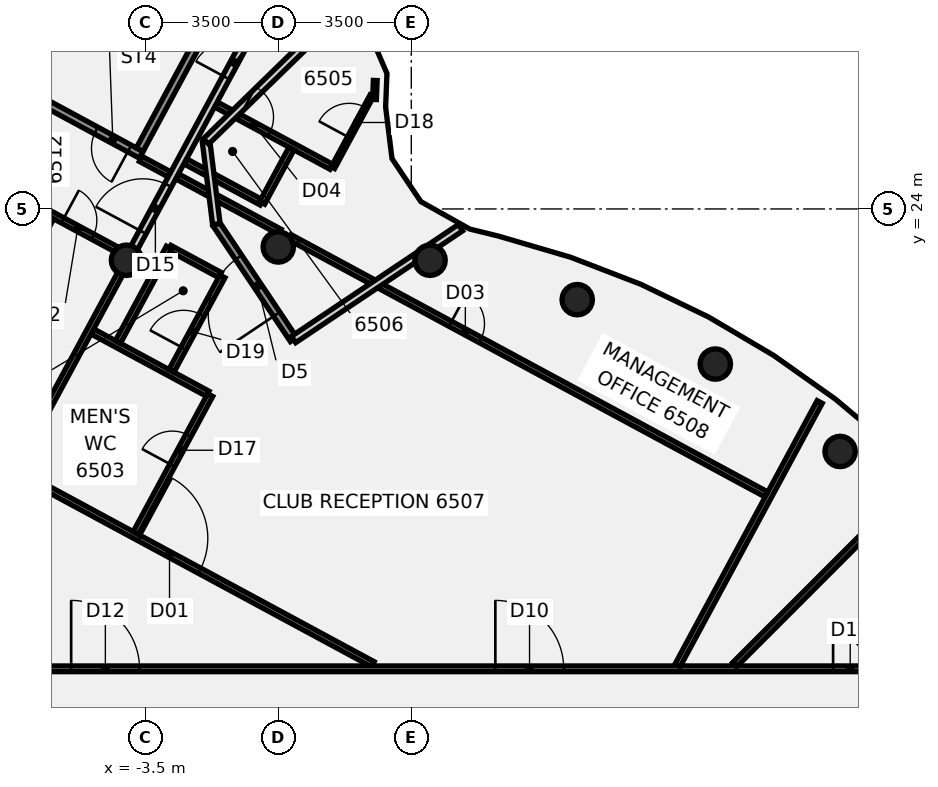
"""IFC4 building model, lengths in metres.
Left out: names, types, materials, properties, quantities, classifications, styles, units other than length and angle.
Written with IfcOpenShell. Run it as: python <this file> out.ifc"""

import sys

from ifc_helpers import new_model, si_unit, direction, frame, frame_2d, origin, origin_2d, place, context, subcontext, project, spatial, rectangle, circle, extrude, element, fill, save


model = new_model("IFC4")
c1 = context("Model", 3, precision=1e-05, world=origin(), true_north=direction((0.0, 1.0)))
c2 = subcontext(c1, "Body", "Model", "MODEL_VIEW")
j1 = project(units=[si_unit("LENGTHUNIT", "METRE"), si_unit("PLANEANGLEUNIT", "RADIAN")], contexts=[c1])
p1 = place(None, origin())
s1 = spatial("IfcSite", under=j1, at=p1, CompositionType="ELEMENT")
p2 = place(p1, origin())
s2 = spatial("IfcBuilding", under=s1, at=p2, CompositionType="ELEMENT")
p3 = place(p2, frame((0.0, 0.0, 256.8)))
s3 = spatial("IfcBuildingStorey", under=s2, at=p3, CompositionType="ELEMENT", Elevation=256.8)
for number, where, z_axis, x_axis in (
    (1, (14.784, 17.619, -0.14), (0.0, 0.0, 1.0), (1.0, 0.0, 0.0)),
    (2, (11.5, 19.919, -0.14), (0.0, 0.0, 1.0), (1.0, 0.0, 0.0)),
    (3, (7.866, 21.613, -0.14), (0.0, 0.0, 1.0), (1.0, 0.0, 0.0)),
    (4, (3.994, 22.651, -0.14), (0.0, 0.0, 1.0), (1.0, 0.0, 0.0)),
    (5, (0.0, 23.0, -0.14), (0.0, 0.0, 1.0), (1.0, 0.0, 0.0)),
    (6, (-3.994, 22.651, -0.14), (0.0, 0.0, 1.0), (1.0, 0.0, 0.0)),
):
    element("IfcColumn", number, at=place(p3, frame(where, z_axis=z_axis, x_axis=x_axis)), inside=s3, PredefinedType="COLUMN", context=c2, shape_type="SweptSolid", body=[
        extrude(circle(Radius=0.4, at=origin_2d()), origin(), (0.0, 0.0, 1.0), 3.6),
    ])
p4 = place(p3, frame((-11.424, 19.529, 0.0), z_axis=(0.0, 0.0, 1.0), x_axis=(0.880009979756, -0.474955193181, 0.0)))
e7 = element("IfcWall", 7, at=p4, inside=s3, PredefinedType="PARTITIONING", context=c2, shape_type="SweptSolid", body=[
    extrude(rectangle(XDim=15.808, YDim=0.15, at=frame_2d((7.904, 0.0))), origin(), (0.0, 0.0, 1.0), 2.864),
])
p5 = place(p4, frame((8.829, 0.0, 0.0)))
e8 = element("IfcOpeningElement", 8, at=p5, cuts=e7, PredefinedType="OPENING", context=c2, shape_type="SweptSolid", body=[
    extrude(rectangle(XDim=1.8, YDim=2.1, at=frame_2d((0.9, 1.05))), frame((0.0, 0.085, 0.0), z_axis=(0.0, -1.0, 0.0), x_axis=(1.0, 0.0, 0.0)), (0.0, 0.0, 1.0), 0.17),
])
p6 = place(p3, frame((-7.808, 24.85, 0.0), z_axis=(0.0, 0.0, 1.0), x_axis=(0.879989576418, -0.474992995101, 0.0)))
e9 = element("IfcWall", 9, at=p6, inside=s3, PredefinedType="PARTITIONING", context=c2, shape_type="SweptSolid", body=[
    extrude(rectangle(XDim=4.025, YDim=0.15, at=frame_2d((2.013, 0.0))), origin(), (0.0, 0.0, 1.0), 2.864),
])
p7 = place(p6, frame((2.425, 0.0, 0.0)))
e10 = element("IfcOpeningElement", 10, at=p7, cuts=e9, PredefinedType="OPENING", context=c2, shape_type="SweptSolid", body=[
    extrude(rectangle(XDim=0.9, YDim=2.1, at=frame_2d((0.45, 1.05))), frame((0.0, 0.085, 0.0), z_axis=(0.0, -1.0, 0.0), x_axis=(1.0, 0.0, 0.0)), (0.0, 0.0, 1.0), 0.17),
])
p8 = place(p3, frame((-4.893, 20.777, 0.0), z_axis=(0.0, 0.0, 1.0), x_axis=(0.880007149788, -0.474960436586, 0.0)))
e11 = element("IfcWall", 11, at=p8, inside=s3, PredefinedType="PARTITIONING", context=c2, shape_type="SweptSolid", body=[
    extrude(rectangle(XDim=3.45, YDim=0.15, at=frame_2d((1.725, 0.0))), origin(), (0.0, 0.0, 1.0), 2.864),
])
p9 = place(p3, frame((-3.619, 25.317, 0.0), z_axis=(0.0, 0.0, 1.0), x_axis=(0.879960000932, -0.475047783659, 0.0)))
e12 = element("IfcWall", 12, at=p9, inside=s3, PredefinedType="PARTITIONING", context=c2, shape_type="SweptSolid", body=[
    extrude(rectangle(XDim=0.86, YDim=0.15, at=frame_2d((0.43, 0.0))), origin(), (0.0, 0.0, 1.0), 2.864),
])
p10 = place(p3, frame((-2.86, 22.976, 0.0), z_axis=(0.0, 0.0, 1.0), x_axis=(0.880085616352, -0.474815024921, 0.0)))
e13 = element("IfcWall", 13, at=p10, inside=s3, PredefinedType="PARTITIONING", context=c2, shape_type="SweptSolid", body=[
    extrude(rectangle(XDim=1.506, YDim=0.15, at=frame_2d((0.753, 0.0))), origin(), (0.0, 0.0, 1.0), 2.864),
])
p11 = place(p3, frame((-2.662, 24.857, 0.0), z_axis=(0.0, 0.0, 1.0), x_axis=(0.880044328611, -0.474891545176, 0.0)))
e14 = element("IfcWall", 14, at=p11, inside=s3, PredefinedType="PARTITIONING", context=c2, shape_type="SweptSolid", body=[
    extrude(rectangle(XDim=3.07, YDim=0.15, at=frame_2d((1.535, 0.0))), origin(), (0.0, 0.0, 1.0), 2.864),
])
p12 = place(p3, frame((0.302, 23.258, 0.0), z_axis=(0.0, 0.0, 1.0), x_axis=(0.88000876601, -0.474957442037, 0.0)))
e15 = element("IfcWall", 15, at=p12, inside=s3, PredefinedType="PARTITIONING", context=c2, shape_type="SweptSolid", body=[
    extrude(rectangle(XDim=14.256, YDim=0.15, at=frame_2d((7.128, 0.0))), origin(), (0.0, 0.0, 1.0), 2.864),
])
p13 = place(p12, frame((4.8, 0.0, 0.0)))
e16 = element("IfcOpeningElement", 16, at=p13, cuts=e15, PredefinedType="OPENING", context=c2, shape_type="SweptSolid", body=[
    extrude(rectangle(XDim=0.9, YDim=2.1, at=frame_2d((0.45, 1.05))), frame((0.0, 0.085, 0.0), z_axis=(0.0, -1.0, 0.0), x_axis=(1.0, 0.0, 0.0)), (0.0, 0.0, 1.0), 0.17),
])
p14 = place(p3, frame((-2.445, 25.251, 0.0), z_axis=(0.0, 0.0, 1.0), x_axis=(0.879950258975, -0.475065828839, 0.0)))
e17 = element("IfcWall", 17, at=p14, inside=s3, PredefinedType="PARTITIONING", context=c2, shape_type="SweptSolid", body=[
    extrude(rectangle(XDim=2.275, YDim=0.15, at=frame_2d((1.138, 0.0))), origin(), (0.0, 0.0, 1.0), 2.864),
])
p15 = place(p3, frame((-1.641, 26.75, 0.0), z_axis=(0.0, 0.0, 1.0), x_axis=(0.879977572417, -0.475015233486, 0.0)))
e18 = element("IfcWall", 18, at=p15, inside=s3, PredefinedType="PARTITIONING", context=c2, shape_type="SweptSolid", body=[
    extrude(rectangle(XDim=3.45, YDim=0.15, at=frame_2d((1.725, 0.0))), origin(), (0.0, 0.0, 1.0), 2.864),
])
p16 = place(p15, frame((0.7, 0.0, 0.0)))
e19 = element("IfcOpeningElement", 19, at=p16, cuts=e18, PredefinedType="OPENING", context=c2, shape_type="SweptSolid", body=[
    extrude(rectangle(XDim=0.9, YDim=2.1, at=frame_2d((0.45, 1.05))), frame((0.0, 0.085, 0.0), z_axis=(0.0, -1.0, 0.0), x_axis=(1.0, 0.0, 0.0)), (0.0, 0.0, 1.0), 0.17),
])
p17 = place(p3, frame((-17.065, 11.9, 0.0), z_axis=(0.0, 0.0, 1.0), x_axis=(1.0, 0.0, 0.0)))
e20 = element("IfcWall", 20, at=p17, inside=s3, PredefinedType="PARTITIONING", context=c2, shape_type="SweptSolid", body=[
    extrude(rectangle(XDim=34.165, YDim=0.15, at=frame_2d((17.083, 0.0))), origin(), (0.0, 0.0, 1.0), 2.864),
])
p18 = place(p17, frame((22.777, 0.0, 0.0)))
e21 = element("IfcOpeningElement", 21, at=p18, cuts=e20, PredefinedType="OPENING", context=c2, shape_type="SweptSolid", body=[
    extrude(rectangle(XDim=1.8, YDim=2.1, at=frame_2d((0.9, 1.05))), frame((0.0, 0.085, 0.0), z_axis=(0.0, -1.0, 0.0), x_axis=(1.0, 0.0, 0.0)), (0.0, 0.0, 1.0), 0.17),
])
p19 = place(p17, frame((31.665, 0.0, 0.0)))
e22 = element("IfcOpeningElement", 22, at=p19, cuts=e20, PredefinedType="OPENING", context=c2, shape_type="SweptSolid", body=[
    extrude(rectangle(XDim=0.9, YDim=2.1, at=frame_2d((0.45, 1.05))), frame((0.0, 0.085, 0.0), z_axis=(0.0, -1.0, 0.0), x_axis=(1.0, 0.0, 0.0)), (0.0, 0.0, 1.0), 0.17),
])
p20 = place(p17, frame((11.615, 0.0, 0.0)))
e23 = element("IfcOpeningElement", 23, at=p20, cuts=e20, PredefinedType="OPENING", context=c2, shape_type="SweptSolid", body=[
    extrude(rectangle(XDim=1.8, YDim=2.1, at=frame_2d((0.9, 1.05))), frame((0.0, 0.085, 0.0), z_axis=(0.0, -1.0, 0.0), x_axis=(1.0, 0.0, 0.0)), (0.0, 0.0, 1.0), 0.17),
])
p21 = place(p3, frame((12.01, 12.01, 0.0), z_axis=(0.0, 0.0, 1.0), x_axis=(0.707106781187, 0.707106781187, 0.0)))
e24 = element("IfcWall", 24, at=p21, inside=s3, PredefinedType="PARTITIONING", context=c2, shape_type="SweptSolid", body=[
    extrude(rectangle(XDim=6.691, YDim=0.15, at=frame_2d((3.345, 0.0))), origin(), (0.0, 0.0, 1.0), 2.864),
])
p22 = place(p3, frame((-7.173, 21.553, 0.0), z_axis=(0.0, 0.0, 1.0), x_axis=(0.475033626328, 0.879967643642, 0.0)))
e25 = element("IfcWall", 25, at=p22, inside=s3, PredefinedType="PARTITIONING", context=c2, shape_type="SweptSolid", body=[
    extrude(rectangle(XDim=2.525, YDim=0.15, at=frame_2d((1.262, 0.0))), origin(), (0.0, 0.0, 1.0), 2.864),
])
p23 = place(p22, frame((1.05, 0.0, 0.0)))
e26 = element("IfcOpeningElement", 26, at=p23, cuts=e25, PredefinedType="OPENING", context=c2, shape_type="SweptSolid", body=[
    extrude(rectangle(XDim=0.9, YDim=2.1, at=frame_2d((0.45, 1.05))), frame((0.0, 0.085, 0.0), z_axis=(0.0, -1.0, 0.0), x_axis=(1.0, 0.0, 0.0)), (0.0, 0.0, 1.0), 0.17),
])
p24 = place(p3, frame((-6.918, 17.183, 0.0), z_axis=(0.0, 0.0, 1.0), x_axis=(0.475010414469, 0.879980173723, 0.0)))
e27 = element("IfcWall", 27, at=p24, inside=s3, PredefinedType="PARTITIONING", context=c2, shape_type="SweptSolid", body=[
    extrude(rectangle(XDim=5.978, YDim=0.15, at=frame_2d((2.989, 0.0))), origin(), (0.0, 0.0, 1.0), 2.864),
])
p25 = place(p3, frame((-3.865, 22.84, 0.0), z_axis=(0.0, 0.0, 1.0), x_axis=(0.474975497938, 0.879999020658, 0.0)))
e28 = element("IfcWall", 28, at=p25, inside=s3, PredefinedType="PARTITIONING", context=c2, shape_type="SweptSolid", body=[
    extrude(rectangle(XDim=7.696, YDim=0.2, at=frame_2d((3.848, 0.0))), origin(), (0.0, 0.0, 1.0), 2.864),
])
p26 = place(p25, frame((0.629, 0.0, 0.0)))
e29 = element("IfcOpeningElement", 29, at=p26, cuts=e28, PredefinedType="OPENING", context=c2, shape_type="SweptSolid", body=[
    extrude(rectangle(XDim=1.4, YDim=2.1, at=frame_2d((0.7, 1.05))), frame((0.0, 0.11, 0.0), z_axis=(0.0, -1.0, 0.0), x_axis=(1.0, 0.0, 0.0)), (0.0, 0.0, 1.0), 0.22),
])
p27 = place(p25, frame((5.247, 0.0, 0.0)))
e30 = element("IfcOpeningElement", 30, at=p27, cuts=e28, PredefinedType="OPENING", context=c2, shape_type="SweptSolid", body=[
    extrude(rectangle(XDim=0.9, YDim=2.1, at=frame_2d((0.45, 1.05))), frame((0.0, 0.11, 0.0), z_axis=(0.0, -1.0, 0.0), x_axis=(1.0, 0.0, 0.0)), (0.0, 0.0, 1.0), 0.22),
])
p28 = place(p3, frame((-4.219, 20.499, 0.0), z_axis=(0.0, 0.0, 1.0), x_axis=(0.47489329303, 0.880043385428, 0.0)))
e31 = element("IfcWall", 31, at=p28, inside=s3, PredefinedType="PARTITIONING", context=c2, shape_type="SweptSolid", body=[
    extrude(rectangle(XDim=2.825, YDim=0.15, at=frame_2d((1.413, 0.0))), origin(), (0.0, 0.0, 1.0), 2.864),
])
p29 = place(p3, frame((-3.75, 15.473, 0.0), z_axis=(0.0, 0.0, 1.0), x_axis=(0.474999530937, 0.879986048531, 0.0)))
e32 = element("IfcWall", 32, at=p29, inside=s3, PredefinedType="PARTITIONING", context=c2, shape_type="SweptSolid", body=[
    extrude(rectangle(XDim=4.125, YDim=0.15, at=frame_2d((2.062, 0.0))), origin(), (0.0, 0.0, 1.0), 2.864),
])
p30 = place(p29, frame((2.025, 0.0, 0.0)))
e33 = element("IfcOpeningElement", 33, at=p30, cuts=e32, PredefinedType="OPENING", context=c2, shape_type="SweptSolid", body=[
    extrude(rectangle(XDim=0.9, YDim=2.1, at=frame_2d((0.45, 1.05))), frame((0.0, 0.085, 0.0), z_axis=(0.0, -1.0, 0.0), x_axis=(1.0, 0.0, 0.0)), (0.0, 0.0, 1.0), 0.17),
])
p31 = place(p3, frame((1.439, 25.087, 0.0), z_axis=(0.0, 0.0, 1.0), x_axis=(0.475008069141, 0.87998143972, 0.0)))
e34 = element("IfcWall", 34, at=p31, inside=s3, PredefinedType="PARTITIONING", context=c2, shape_type="SweptSolid", body=[
    extrude(rectangle(XDim=2.147, YDim=0.1, at=frame_2d((1.074, 0.0))), origin(), (0.0, 0.0, 1.0), 2.864),
])
p32 = place(p31, frame((0.9, 0.0, 0.0)))
e35 = element("IfcOpeningElement", 35, at=p32, cuts=e34, PredefinedType="OPENING", context=c2, shape_type="SweptSolid", body=[
    extrude(rectangle(XDim=0.9, YDim=2.1, at=frame_2d((0.45, 1.05))), frame((0.0, 0.06, 0.0), z_axis=(0.0, -1.0, 0.0), x_axis=(1.0, 0.0, 0.0)), (0.0, 0.0, 1.0), 0.12),
])
p33 = place(p3, frame((-2.811, 19.739, 0.0), z_axis=(0.0, 0.0, 1.0), x_axis=(0.475094053196, 0.879935020679, 0.0)))
e36 = element("IfcWall", 36, at=p33, inside=s3, PredefinedType="PARTITIONING", context=c2, shape_type="SweptSolid", body=[
    extrude(rectangle(XDim=2.825, YDim=0.15, at=frame_2d((1.413, 0.0))), origin(), (0.0, 0.0, 1.0), 2.864),
])
p34 = place(p33, frame((0.675, 0.0, 0.0)))
e37 = element("IfcOpeningElement", 37, at=p34, cuts=e36, PredefinedType="OPENING", context=c2, shape_type="SweptSolid", body=[
    extrude(rectangle(XDim=1.0, YDim=2.1, at=frame_2d((0.5, 1.05))), frame((0.0, 0.085, 0.0), z_axis=(0.0, -1.0, 0.0), x_axis=(1.0, 0.0, 0.0)), (0.0, 0.0, 1.0), 0.17),
])
p35 = place(p3, frame((-0.424, 24.16, 0.0), z_axis=(0.0, 0.0, 1.0), x_axis=(0.475111699271, 0.879925492991, 0.0)))
e38 = element("IfcWall", 38, at=p35, inside=s3, PredefinedType="PARTITIONING", context=c2, shape_type="SweptSolid", body=[
    extrude(rectangle(XDim=1.625, YDim=0.15, at=frame_2d((0.812, 0.0))), origin(), (0.0, 0.0, 1.0), 2.864),
])
p36 = place(p3, frame((10.508, 11.992, 0.0), z_axis=(0.0, 0.0, 1.0), x_axis=(0.474916972047, 0.88003060723, 0.0)))
e39 = element("IfcWall", 39, at=p36, inside=s3, PredefinedType="PARTITIONING", context=c2, shape_type="SweptSolid", body=[
    extrude(rectangle(XDim=7.873, YDim=0.15, at=frame_2d((3.937, 0.0))), origin(), (0.0, 0.0, 1.0), 2.864),
])
p37 = place(p3, frame((2.532, 26.881, 0.0), z_axis=(0.0, 0.0, 1.0), x_axis=(0.039539159627, 0.999218021683, 0.0)))
e40 = element("IfcWall", 40, at=p37, inside=s3, PredefinedType="PARTITIONING", context=c2, shape_type="SweptSolid", body=[
    extrude(rectangle(XDim=0.5, YDim=0.1, at=frame_2d((0.25, 0.0))), origin(), (0.0, 0.0, 1.0), 2.864),
])
p38 = place(p3, frame((0.403, 20.565, 0.0), z_axis=(0.0, 0.0, 1.0), x_axis=(-0.55638015725, 0.830927867278, 0.0)))
e41 = element("IfcWall", 41, at=p38, inside=s3, PredefinedType="SOLIDWALL", context=c2, shape_type="SweptSolid", body=[
    extrude(rectangle(XDim=3.653, YDim=0.2, at=frame_2d((1.827, 0.0))), origin(), (0.0, 0.0, 1.0), 2.964),
])
p39 = place(p38, frame((0.8, 0.0, 0.0)))
e42 = element("IfcOpeningElement", 42, at=p39, cuts=e41, PredefinedType="OPENING", context=c2, shape_type="SweptSolid", body=[
    extrude(rectangle(XDim=1.8, YDim=2.4, at=frame_2d((0.9, 1.2))), frame((0.0, 0.11, 0.0), z_axis=(0.0, -1.0, 0.0), x_axis=(1.0, 0.0, 0.0)), (0.0, 0.0, 1.0), 0.22),
])
p40 = place(p3, frame((0.403, 20.565, 0.0), z_axis=(0.0, 0.0, 1.0), x_axis=(0.830933103282, 0.556372337441, 0.0)))
e43 = element("IfcWall", 43, at=p40, inside=s3, PredefinedType="SOLIDWALL", context=c2, shape_type="SweptSolid", body=[
    extrude(rectangle(XDim=5.286, YDim=0.2, at=frame_2d((2.643, 0.0))), origin(), (0.0, 0.0, 1.0), 3.46),
])
p41 = place(p3, frame((-1.63, 23.601, 0.0), z_axis=(0.0, 0.0, 1.0), x_axis=(-0.12306236425, 0.99239893919, 0.0)))
e44 = element("IfcWall", 44, at=p41, inside=s3, PredefinedType="SOLIDWALL", context=c2, shape_type="SweptSolid", body=[
    extrude(rectangle(XDim=2.194, YDim=0.2, at=frame_2d((1.097, 0.0))), origin(), (0.0, 0.0, 1.0), 3.46),
])
p42 = place(p3, frame((-1.9, 25.778, 0.0), z_axis=(0.0, 0.0, 1.0), x_axis=(0.716859267363, 0.697217893342, 0.0)))
e45 = element("IfcWall", 45, at=p42, inside=s3, PredefinedType="SOLIDWALL", context=c2, shape_type="SweptSolid", body=[
    extrude(rectangle(XDim=4.798, YDim=0.2, at=frame_2d((2.399, 0.0))), origin(), (0.0, 0.0, 1.0), 3.46),
])
p43 = place(p3, frame((-3.607, 25.424, -0.14), z_axis=(0.0, 0.0, 1.0), x_axis=(-0.879996788685, 0.474979633147, 0.0)))
e46 = element("IfcWall", 46, at=p43, inside=s3, PredefinedType="SHEAR", context=c2, shape_type="SweptSolid", body=[
    extrude(rectangle(XDim=6.7, YDim=0.2, at=frame_2d((3.35, 0.0))), origin(), (0.0, 0.0, 1.0), 3.154),
])
p44 = place(p43, frame((0.35, 0.0, 0.0)))
e47 = element("IfcOpeningElement", 47, at=p44, cuts=e46, PredefinedType="OPENING", context=c2, shape_type="SweptSolid", body=[
    extrude(rectangle(XDim=1.0, YDim=2.1, at=frame_2d((0.5, 1.05))), frame((0.0, 0.11, 0.0), z_axis=(0.0, -1.0, 0.0), x_axis=(1.0, 0.0, 0.0)), (0.0, 0.0, 1.0), 0.22),
])
p45 = place(p3, frame((-2.127, 28.375, -0.14), z_axis=(0.0, 0.0, 1.0), x_axis=(-0.475009504157, -0.879980665106, 0.0)))
e48 = element("IfcWall", 48, at=p45, inside=s3, PredefinedType="SHEAR", context=c2, shape_type="SweptSolid", body=[
    extrude(rectangle(XDim=3.2, YDim=0.2, at=frame_2d((1.6, 0.0))), origin(), (0.0, 0.0, 1.0), 3.6),
])
p46 = place(p5, origin())
e49 = element("IfcDoor", 49, at=p46, inside=s3, OperationType="DOUBLE_DOOR_SINGLE_SWING", PredefinedType="DOOR", context=c2, shape_type="SweptSolid", body=[
    extrude(rectangle(XDim=1.8, YDim=2.1, at=frame_2d((0.9, 1.05))), frame((0.0, 0.025, 0.0), z_axis=(0.0, -1.0, 0.0), x_axis=(1.0, 0.0, 0.0)), (0.0, 0.0, 1.0), 0.05),
])
fill(e8, e49)
p47 = place(p7, frame((0.9, 0.0, 0.0), z_axis=(0.0, 0.0, 1.0), x_axis=(-1.0, 0.0, 0.0)))
e50 = element("IfcDoor", 50, at=p47, inside=s3, OperationType="SINGLE_SWING_RIGHT", PredefinedType="DOOR", context=c2, shape_type="SweptSolid", body=[
    extrude(rectangle(XDim=0.9, YDim=2.1, at=frame_2d((0.45, 1.05))), frame((0.0, 0.025, 0.0), z_axis=(0.0, -1.0, 0.0), x_axis=(1.0, 0.0, 0.0)), (0.0, 0.0, 1.0), 0.05),
])
fill(e10, e50)
p48 = place(p13, origin())
e51 = element("IfcDoor", 51, at=p48, inside=s3, OperationType="SINGLE_SWING_RIGHT", PredefinedType="DOOR", context=c2, shape_type="SweptSolid", body=[
    extrude(rectangle(XDim=0.9, YDim=2.1, at=frame_2d((0.45, 1.05))), frame((0.0, 0.025, 0.0), z_axis=(0.0, -1.0, 0.0), x_axis=(1.0, 0.0, 0.0)), (0.0, 0.0, 1.0), 0.05),
])
fill(e16, e51)
p49 = place(p16, frame((0.9, 0.0, 0.0), z_axis=(0.0, 0.0, 1.0), x_axis=(-1.0, 0.0, 0.0)))
e52 = element("IfcDoor", 52, at=p49, inside=s3, OperationType="SINGLE_SWING_LEFT", PredefinedType="DOOR", context=c2, shape_type="SweptSolid", body=[
    extrude(rectangle(XDim=0.9, YDim=2.1, at=frame_2d((0.45, 1.05))), frame((0.0, 0.025, 0.0), z_axis=(0.0, -1.0, 0.0), x_axis=(1.0, 0.0, 0.0)), (0.0, 0.0, 1.0), 0.05),
])
fill(e19, e52)
p50 = place(p18, frame((1.8, 0.0, 0.0), z_axis=(0.0, 0.0, 1.0), x_axis=(-1.0, 0.0, 0.0)))
e53 = element("IfcDoor", 53, at=p50, inside=s3, OperationType="DOUBLE_DOOR_SINGLE_SWING", PredefinedType="DOOR", context=c2, shape_type="SweptSolid", body=[
    extrude(rectangle(XDim=1.8, YDim=2.1, at=frame_2d((0.9, 1.05))), frame((0.0, 0.025, 0.0), z_axis=(0.0, -1.0, 0.0), x_axis=(1.0, 0.0, 0.0)), (0.0, 0.0, 1.0), 0.05),
])
fill(e21, e53)
p51 = place(p19, origin())
e54 = element("IfcDoor", 54, at=p51, inside=s3, OperationType="SINGLE_SWING_LEFT", PredefinedType="DOOR", context=c2, shape_type="SweptSolid", body=[
    extrude(rectangle(XDim=0.9, YDim=2.1, at=frame_2d((0.45, 1.05))), frame((0.0, 0.025, 0.0), z_axis=(0.0, -1.0, 0.0), x_axis=(1.0, 0.0, 0.0)), (0.0, 0.0, 1.0), 0.05),
])
fill(e22, e54)
p52 = place(p20, frame((1.8, 0.0, 0.0), z_axis=(0.0, 0.0, 1.0), x_axis=(-1.0, 0.0, 0.0)))
e55 = element("IfcDoor", 55, at=p52, inside=s3, OperationType="DOUBLE_DOOR_SINGLE_SWING", PredefinedType="DOOR", context=c2, shape_type="SweptSolid", body=[
    extrude(rectangle(XDim=1.8, YDim=2.1, at=frame_2d((0.9, 1.05))), frame((0.0, 0.025, 0.0), z_axis=(0.0, -1.0, 0.0), x_axis=(1.0, 0.0, 0.0)), (0.0, 0.0, 1.0), 0.05),
])
fill(e23, e55)
p53 = place(p26, frame((1.4, 0.0, 0.0), z_axis=(0.0, 0.0, 1.0), x_axis=(-1.0, 0.0, 0.0)))
e56 = element("IfcDoor", 56, at=p53, inside=s3, OperationType="DOUBLE_DOOR_SINGLE_SWING", PredefinedType="DOOR", context=c2, shape_type="SweptSolid", body=[
    extrude(rectangle(XDim=1.4, YDim=2.1, at=frame_2d((0.7, 1.05))), frame((0.0, 0.025, 0.0), z_axis=(0.0, -1.0, 0.0), x_axis=(1.0, 0.0, 0.0)), (0.0, 0.0, 1.0), 0.05),
])
fill(e29, e56)
p54 = place(p27, origin())
e57 = element("IfcDoor", 57, at=p54, inside=s3, OperationType="SINGLE_SWING_LEFT", PredefinedType="DOOR", context=c2, shape_type="SweptSolid", body=[
    extrude(rectangle(XDim=0.9, YDim=2.1, at=frame_2d((0.45, 1.05))), frame((0.0, 0.025, 0.0), z_axis=(0.0, -1.0, 0.0), x_axis=(1.0, 0.0, 0.0)), (0.0, 0.0, 1.0), 0.05),
])
fill(e30, e57)
p55 = place(p30, origin())
e58 = element("IfcDoor", 58, at=p55, inside=s3, OperationType="SINGLE_SWING_LEFT", PredefinedType="DOOR", context=c2, shape_type="SweptSolid", body=[
    extrude(rectangle(XDim=0.9, YDim=2.1, at=frame_2d((0.45, 1.05))), frame((0.0, 0.025, 0.0), z_axis=(0.0, -1.0, 0.0), x_axis=(1.0, 0.0, 0.0)), (0.0, 0.0, 1.0), 0.05),
])
fill(e33, e58)
p56 = place(p32, origin())
e59 = element("IfcDoor", 59, at=p56, inside=s3, OperationType="SINGLE_SWING_LEFT", PredefinedType="DOOR", context=c2, shape_type="SweptSolid", body=[
    extrude(rectangle(XDim=0.9, YDim=2.1, at=frame_2d((0.45, 1.05))), frame((0.0, 0.025, 0.0), z_axis=(0.0, -1.0, 0.0), x_axis=(1.0, 0.0, 0.0)), (0.0, 0.0, 1.0), 0.05),
])
fill(e35, e59)
p57 = place(p34, origin())
e60 = element("IfcDoor", 60, at=p57, inside=s3, OperationType="SINGLE_SWING_RIGHT", PredefinedType="DOOR", context=c2, shape_type="SweptSolid", body=[
    extrude(rectangle(XDim=1.0, YDim=2.1, at=frame_2d((0.5, 1.05))), frame((0.0, 0.025, 0.0), z_axis=(0.0, -1.0, 0.0), x_axis=(1.0, 0.0, 0.0)), (0.0, 0.0, 1.0), 0.05),
])
fill(e37, e60)
p58 = place(p39, origin())
e61 = element("IfcDoor", 61, at=p58, inside=s3, OperationType="SINGLE_SWING_LEFT", PredefinedType="DOOR", context=c2, shape_type="SweptSolid", body=[
    extrude(rectangle(XDim=1.8, YDim=2.4, at=frame_2d((0.9, 1.2))), frame((0.0, 0.025, 0.0), z_axis=(0.0, -1.0, 0.0), x_axis=(1.0, 0.0, 0.0)), (0.0, 0.0, 1.0), 0.05),
])
fill(e42, e61)
p59 = place(p44, origin())
e62 = element("IfcDoor", 62, at=p59, inside=s3, OperationType="SINGLE_SWING_LEFT", PredefinedType="DOOR", context=c2, shape_type="SweptSolid", body=[
    extrude(rectangle(XDim=1.0, YDim=2.1, at=frame_2d((0.5, 1.05))), frame((0.0, 0.025, 0.0), z_axis=(0.0, -1.0, 0.0), x_axis=(1.0, 0.0, 0.0)), (0.0, 0.0, 1.0), 0.05),
])
fill(e47, e62)
save(model, sys.argv[1])
